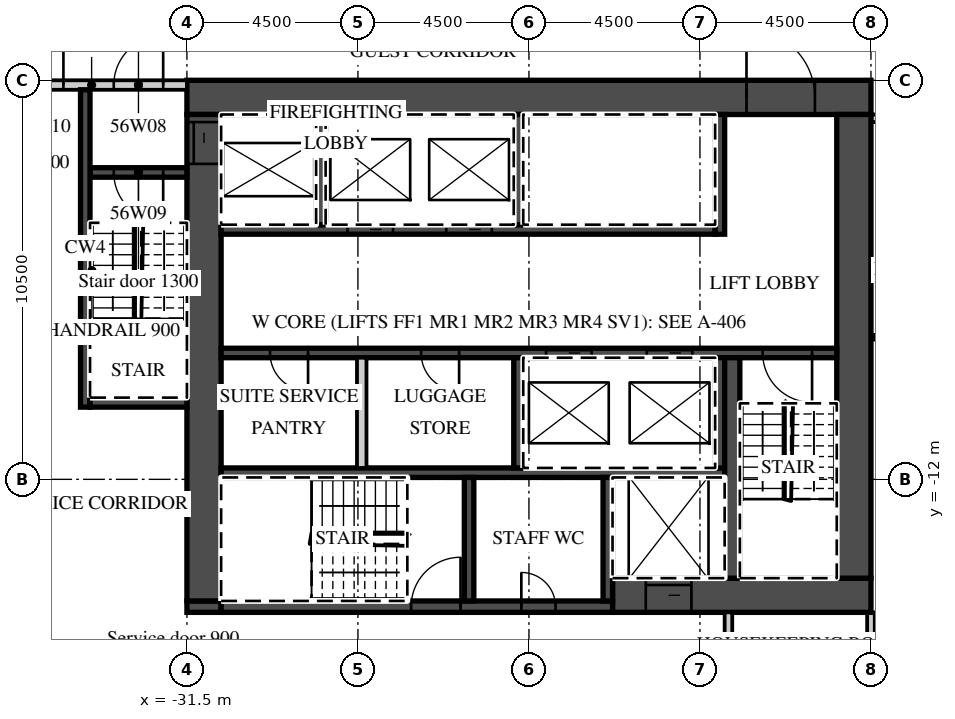
"""IFC4 building model, lengths in metres.
Left out: names, types, materials, properties, quantities, classifications, styles, units other than length and angle.
Written with IfcOpenShell. Run it as: python <this file> out.ifc"""

import sys

from ifc_helpers import new_model, si_unit, direction, frame, frame_2d, origin, place, context, subcontext, project, spatial, rectangle, extrude, element, fill, save


model = new_model("IFC4")
c1 = context("Model", 3, precision=1e-05, world=origin(), true_north=direction((0.0, 1.0)))
c2 = subcontext(c1, "Body", "Model", "MODEL_VIEW")
j1 = project(units=[si_unit("LENGTHUNIT", "METRE"), si_unit("PLANEANGLEUNIT", "RADIAN")], contexts=[c1])
p1 = place(None, origin())
s1 = spatial("IfcSite", under=j1, at=p1, CompositionType="ELEMENT")
p2 = place(p1, origin())
s2 = spatial("IfcBuilding", under=s1, at=p2, CompositionType="ELEMENT")
p3 = place(p2, frame((0.0, 0.0, 230.9)))
s3 = spatial("IfcBuildingStorey", under=s2, at=p3, CompositionType="ELEMENT", Elevation=230.9)
p4 = place(p3, frame((-13.5, -19.641, 0.0), z_axis=(0.0, 0.0, 1.0), x_axis=(0.0, 1.0, 0.0)))
e1 = element("IfcWall", 1, at=p4, inside=s3, PredefinedType="PARTITIONING", context=c2, shape_type="SweptSolid", body=[
    extrude(rectangle(XDim=4.141, YDim=0.2, at=frame_2d((2.071, 0.0))), origin(), (0.0, 0.0, 1.0), 3.02),
])
p5 = place(p3, frame((-13.5, -2.5, 0.0), z_axis=(0.0, 0.0, 1.0), x_axis=(1.0, 0.0, 0.0)))
e2 = element("IfcWall", 2, at=p5, inside=s3, PredefinedType="PARTITIONING", context=c2, shape_type="SweptSolid", body=[
    extrude(rectangle(XDim=27.0, YDim=0.2, at=frame_2d((13.5, 0.0))), origin(), (0.0, 0.0, 1.0), 3.02),
])
p6 = place(p5, frame((2.925, 0.0, 0.0)))
e3 = element("IfcOpeningElement", 3, at=p6, cuts=e2, PredefinedType="OPENING", context=c2, shape_type="SweptSolid", body=[
    extrude(rectangle(XDim=1.0, YDim=2.1, at=frame_2d((0.5, 1.05))), frame((0.0, 0.11, 0.0), z_axis=(0.0, -1.0, 0.0), x_axis=(1.0, 0.0, 0.0)), (0.0, 0.0, 1.0), 0.22),
])
p7 = place(p5, frame((9.863, 0.0, 0.0)))
e4 = element("IfcOpeningElement", 4, at=p7, cuts=e2, PredefinedType="OPENING", context=c2, shape_type="SweptSolid", body=[
    extrude(rectangle(XDim=1.2, YDim=2.1, at=frame_2d((0.6, 1.05))), frame((0.0, 0.11, 0.0), z_axis=(0.0, -1.0, 0.0), x_axis=(1.0, 0.0, 0.0)), (0.0, 0.0, 1.0), 0.22),
])
p8 = place(p5, frame((16.45, 0.0, 0.0)))
e5 = element("IfcOpeningElement", 5, at=p8, cuts=e2, PredefinedType="OPENING", context=c2, shape_type="SweptSolid", body=[
    extrude(rectangle(XDim=1.0, YDim=2.1, at=frame_2d((0.5, 1.05))), frame((0.0, 0.11, 0.0), z_axis=(0.0, -1.0, 0.0), x_axis=(1.0, 0.0, 0.0)), (0.0, 0.0, 1.0), 0.22),
])
p9 = place(p5, frame((20.925, 0.0, 0.0)))
e6 = element("IfcOpeningElement", 6, at=p9, cuts=e2, PredefinedType="OPENING", context=c2, shape_type="SweptSolid", body=[
    extrude(rectangle(XDim=1.0, YDim=2.1, at=frame_2d((0.5, 1.05))), frame((0.0, 0.11, 0.0), z_axis=(0.0, -1.0, 0.0), x_axis=(1.0, 0.0, 0.0)), (0.0, 0.0, 1.0), 0.22),
])
p10 = place(p5, frame((25.425, 0.0, 0.0)))
e7 = element("IfcOpeningElement", 7, at=p10, cuts=e2, PredefinedType="OPENING", context=c2, shape_type="SweptSolid", body=[
    extrude(rectangle(XDim=1.0, YDim=2.1, at=frame_2d((0.5, 1.05))), frame((0.0, 0.11, 0.0), z_axis=(0.0, -1.0, 0.0), x_axis=(1.0, 0.0, 0.0)), (0.0, 0.0, 1.0), 0.22),
])
p11 = place(p3, frame((-31.5, -1.95, 0.0), z_axis=(0.0, 0.0, 1.0), x_axis=(1.0, 0.0, 0.0)))
e8 = element("IfcWall", 8, at=p11, inside=s3, PredefinedType="SHEAR", context=c2, shape_type="SweptSolid", body=[
    extrude(rectangle(XDim=18.0, YDim=0.9, at=frame_2d((9.0, 0.0))), origin(), (0.0, 0.0, 1.0), 3.02),
])
p12 = place(p11, frame((14.725, 0.0, 0.0)))
e9 = element("IfcOpeningElement", 9, at=p12, cuts=e8, PredefinedType="OPENING", context=c2, shape_type="SweptSolid", body=[
    extrude(rectangle(XDim=1.8, YDim=2.1, at=frame_2d((0.9, 1.05))), frame((0.0, 0.46, 0.0), z_axis=(0.0, -1.0, 0.0), x_axis=(1.0, 0.0, 0.0)), (0.0, 0.0, 1.0), 0.92),
])
p13 = place(p3, frame((-20.3, -15.05, 0.0), z_axis=(0.0, 0.0, 1.0), x_axis=(1.0, 0.0, 0.0)))
e10 = element("IfcWall", 10, at=p13, inside=s3, PredefinedType="SHEAR", context=c2, shape_type="SweptSolid", body=[
    extrude(rectangle(XDim=6.8, YDim=0.9, at=frame_2d((3.4, 0.0))), origin(), (0.0, 0.0, 1.0), 3.02),
])
p14 = place(p13, frame((0.875, 0.0, 0.0)))
e11 = element("IfcOpeningElement", 11, at=p14, cuts=e10, PredefinedType="OPENING", context=c2, shape_type="SweptSolid", body=[
    extrude(rectangle(XDim=1.2, YDim=2.1, at=frame_2d((0.6, 1.05))), frame((0.0, 0.46, 0.0), z_axis=(0.0, -1.0, 0.0), x_axis=(1.0, 0.0, 0.0)), (0.0, 0.0, 1.0), 0.92),
])
p15 = place(p3, frame((-31.5, -15.35, 0.0), z_axis=(0.0, 0.0, 1.0), x_axis=(1.0, 0.0, 0.0)))
e12 = element("IfcWall", 12, at=p15, inside=s3, PredefinedType="SHEAR", context=c2, shape_type="SweptSolid", body=[
    extrude(rectangle(XDim=0.9, YDim=0.3, at=frame_2d((0.45, 0.0))), origin(), (0.0, 0.0, 1.0), 3.02),
])
p16 = place(p3, frame((-30.6, -15.35, 0.0), z_axis=(0.0, 0.0, 1.0), x_axis=(1.0, 0.0, 0.0)))
e13 = element("IfcWall", 13, at=p16, inside=s3, PredefinedType="SHEAR", context=c2, shape_type="SweptSolid", body=[
    extrude(rectangle(XDim=10.3, YDim=0.3, at=frame_2d((5.15, 0.0))), origin(), (0.0, 0.0, 1.0), 3.02),
])
p17 = place(p16, frame((5.0, 0.0, 0.0)))
e14 = element("IfcOpeningElement", 14, at=p17, cuts=e13, PredefinedType="OPENING", context=c2, shape_type="SweptSolid", body=[
    extrude(rectangle(XDim=1.3, YDim=2.1, at=frame_2d((0.65, 1.05))), frame((0.0, 0.16, 0.0), z_axis=(0.0, -1.0, 0.0), x_axis=(1.0, 0.0, 0.0)), (0.0, 0.0, 1.0), 0.32),
])
p18 = place(p16, frame((7.9, 0.0, 0.0)))
e15 = element("IfcOpeningElement", 15, at=p18, cuts=e13, PredefinedType="OPENING", context=c2, shape_type="SweptSolid", body=[
    extrude(rectangle(XDim=0.9, YDim=2.1, at=frame_2d((0.45, 1.05))), frame((0.0, 0.16, 0.0), z_axis=(0.0, -1.0, 0.0), x_axis=(1.0, 0.0, 0.0)), (0.0, 0.0, 1.0), 0.32),
])
p19 = place(p3, frame((-31.05, -15.2, 0.0), z_axis=(0.0, 0.0, 1.0), x_axis=(0.0, 1.0, 0.0)))
e16 = element("IfcWall", 16, at=p19, inside=s3, PredefinedType="SHEAR", context=c2, shape_type="SweptSolid", body=[
    extrude(rectangle(XDim=12.8, YDim=0.9, at=frame_2d((6.4, 0.0))), origin(), (0.0, 0.0, 1.0), 3.02),
])
p20 = place(p19, frame((11.5, 0.0, 0.0)))
e17 = element("IfcOpeningElement", 17, at=p20, cuts=e16, PredefinedType="OPENING", context=c2, shape_type="SweptSolid", body=[
    extrude(rectangle(XDim=1.1, YDim=2.1, at=frame_2d((0.55, 1.05))), frame((0.0, 0.46, 0.0), z_axis=(0.0, -1.0, 0.0), x_axis=(1.0, 0.0, 0.0)), (0.0, 0.0, 1.0), 0.92),
])
p21 = place(p3, frame((-13.95, -14.6, 0.0), z_axis=(0.0, 0.0, 1.0), x_axis=(0.0, 1.0, 0.0)))
e18 = element("IfcWall", 18, at=p21, inside=s3, PredefinedType="SHEAR", context=c2, shape_type="SweptSolid", body=[
    extrude(rectangle(XDim=12.2, YDim=0.9, at=frame_2d((6.1, 0.0))), origin(), (0.0, 0.0, 1.0), 3.02),
])
p22 = place(p3, frame((-30.6, -5.425, 0.0), z_axis=(0.0, 0.0, 1.0), x_axis=(1.0, 0.0, 0.0)))
e19 = element("IfcWall", 19, at=p22, inside=s3, PredefinedType="SHEAR", context=c2, shape_type="SweptSolid", body=[
    extrude(rectangle(XDim=13.0, YDim=0.25, at=frame_2d((6.5, 0.0))), origin(), (0.0, 0.0, 1.0), 3.02),
])
p23 = place(p22, frame((3.325, 0.0, 0.0)))
e20 = element("IfcOpeningElement", 20, at=p23, cuts=e19, PredefinedType="OPENING", context=c2, shape_type="SweptSolid", body=[
    extrude(rectangle(XDim=1.2, YDim=2.1, at=frame_2d((0.6, 1.05))), frame((0.0, 0.135, 0.0), z_axis=(0.0, -1.0, 0.0), x_axis=(1.0, 0.0, 0.0)), (0.0, 0.0, 1.0), 0.27),
])
p24 = place(p22, frame((5.925, 0.0, 0.0)))
e21 = element("IfcOpeningElement", 21, at=p24, cuts=e19, PredefinedType="OPENING", context=c2, shape_type="SweptSolid", body=[
    extrude(rectangle(XDim=1.2, YDim=2.1, at=frame_2d((0.6, 1.05))), frame((0.0, 0.135, 0.0), z_axis=(0.0, -1.0, 0.0), x_axis=(1.0, 0.0, 0.0)), (0.0, 0.0, 1.0), 0.27),
])
p25 = place(p3, frame((-17.475, -5.55, 0.0), z_axis=(0.0, 0.0, 1.0), x_axis=(0.0, 1.0, 0.0)))
e22 = element("IfcWall", 22, at=p25, inside=s3, PredefinedType="SHEAR", context=c2, shape_type="SweptSolid", body=[
    extrude(rectangle(XDim=3.15, YDim=0.25, at=frame_2d((1.575, 0.0))), origin(), (0.0, 0.0, 1.0), 3.02),
])
for number, where, z_axis, x_axis in (
    (23, (-27.975, -5.3, 0.0), (0.0, 0.0, 1.0), (0.0, 1.0, 0.0)),
    (24, (-22.775, -5.3, 0.0), (0.0, 0.0, 1.0), (0.0, 1.0, 0.0)),
):
    element("IfcWall", number, at=place(p3, frame(where, z_axis=z_axis, x_axis=x_axis)), inside=s3, PredefinedType="SHEAR", context=c2, shape_type="SweptSolid", body=[
        extrude(rectangle(XDim=2.9, YDim=0.25, at=frame_2d((1.45, 0.0))), origin(), (0.0, 0.0, 1.0), 3.02),
    ])
p26 = place(p3, frame((-30.6, -8.675, 0.0), z_axis=(0.0, 0.0, 1.0), x_axis=(1.0, 0.0, 0.0)))
e25 = element("IfcWall", 25, at=p26, inside=s3, PredefinedType="SHEAR", context=c2, shape_type="SweptSolid", body=[
    extrude(rectangle(XDim=16.2, YDim=0.25, at=frame_2d((8.1, 0.0))), origin(), (0.0, 0.0, 1.0), 3.02),
])
p27 = place(p26, frame((8.55, 0.0, 0.0)))
e26 = element("IfcOpeningElement", 26, at=p27, cuts=e25, PredefinedType="OPENING", context=c2, shape_type="SweptSolid", body=[
    extrude(rectangle(XDim=1.2, YDim=2.1, at=frame_2d((0.6, 1.05))), frame((0.0, 0.135, 0.0), z_axis=(0.0, -1.0, 0.0), x_axis=(1.0, 0.0, 0.0)), (0.0, 0.0, 1.0), 0.27),
])
p28 = place(p26, frame((11.2, 0.0, 0.0)))
e27 = element("IfcOpeningElement", 27, at=p28, cuts=e25, PredefinedType="OPENING", context=c2, shape_type="SweptSolid", body=[
    extrude(rectangle(XDim=1.2, YDim=2.1, at=frame_2d((0.6, 1.05))), frame((0.0, 0.135, 0.0), z_axis=(0.0, -1.0, 0.0), x_axis=(1.0, 0.0, 0.0)), (0.0, 0.0, 1.0), 0.27),
])
p29 = place(p26, frame((14.25, 0.0, 0.0)))
e28 = element("IfcOpeningElement", 28, at=p29, cuts=e25, PredefinedType="OPENING", context=c2, shape_type="SweptSolid", body=[
    extrude(rectangle(XDim=1.3, YDim=2.1, at=frame_2d((0.65, 1.05))), frame((0.0, 0.135, 0.0), z_axis=(0.0, -1.0, 0.0), x_axis=(1.0, 0.0, 0.0)), (0.0, 0.0, 1.0), 0.27),
])
p30 = place(p26, frame((1.288, 0.0, 0.0)))
e29 = element("IfcOpeningElement", 29, at=p30, cuts=e25, PredefinedType="OPENING", context=c2, shape_type="SweptSolid", body=[
    extrude(rectangle(XDim=1.0, YDim=2.1, at=frame_2d((0.5, 1.05))), frame((0.0, 0.135, 0.0), z_axis=(0.0, -1.0, 0.0), x_axis=(1.0, 0.0, 0.0)), (0.0, 0.0, 1.0), 0.27),
])
p31 = place(p26, frame((5.262, 0.0, 0.0)))
e30 = element("IfcOpeningElement", 30, at=p31, cuts=e25, PredefinedType="OPENING", context=c2, shape_type="SweptSolid", body=[
    extrude(rectangle(XDim=1.0, YDim=2.1, at=frame_2d((0.5, 1.05))), frame((0.0, 0.135, 0.0), z_axis=(0.0, -1.0, 0.0), x_axis=(1.0, 0.0, 0.0)), (0.0, 0.0, 1.0), 0.27),
])
p32 = place(p3, frame((-30.6, -11.825, 0.0), z_axis=(0.0, 0.0, 1.0), x_axis=(1.0, 0.0, 0.0)))
e31 = element("IfcWall", 31, at=p32, inside=s3, PredefinedType="SHEAR", context=c2, shape_type="SweptSolid", body=[
    extrude(rectangle(XDim=13.25, YDim=0.25, at=frame_2d((6.625, 0.0))), origin(), (0.0, 0.0, 1.0), 3.02),
])
for number, where, z_axis, x_axis in (
    (32, (-17.475, -11.7, 0.0), (0.0, 0.0, 1.0), (0.0, 1.0, 0.0)),
    (33, (-22.775, -11.7, 0.0), (0.0, 0.0, 1.0), (0.0, 1.0, 0.0)),
):
    element("IfcWall", number, at=place(p3, frame(where, z_axis=z_axis, x_axis=x_axis)), inside=s3, PredefinedType="SHEAR", context=c2, shape_type="SweptSolid", body=[
        extrude(rectangle(XDim=2.9, YDim=0.25, at=frame_2d((1.45, 0.0))), origin(), (0.0, 0.0, 1.0), 3.02),
    ])
p33 = place(p3, frame((-26.9, -11.7, 0.0), z_axis=(0.0, 0.0, 1.0), x_axis=(0.0, 1.0, 0.0)))
e34 = element("IfcWall", 34, at=p33, inside=s3, PredefinedType="PARTITIONING", context=c2, shape_type="SweptSolid", body=[
    extrude(rectangle(XDim=2.9, YDim=0.25, at=frame_2d((1.45, 0.0))), origin(), (0.0, 0.0, 1.0), 3.02),
])
p34 = place(p3, frame((-17.15, -14.6, 0.0), z_axis=(0.0, 0.0, 1.0), x_axis=(0.0, 1.0, 0.0)))
e35 = element("IfcWall", 35, at=p34, inside=s3, PredefinedType="SHEAR", context=c2, shape_type="SweptSolid", body=[
    extrude(rectangle(XDim=5.8, YDim=0.4, at=frame_2d((2.9, 0.0))), origin(), (0.0, 0.0, 1.0), 3.02),
])
for number, where, z_axis, x_axis in (
    (36, (-20.425, -15.2, 0.0), (0.0, 0.0, 1.0), (0.0, 1.0, 0.0)),
    (37, (-24.075, -15.2, 0.0), (0.0, 0.0, 1.0), (0.0, 1.0, 0.0)),
):
    element("IfcWall", number, at=place(p3, frame(where, z_axis=z_axis, x_axis=x_axis)), inside=s3, PredefinedType="SHEAR", context=c2, shape_type="SweptSolid", body=[
        extrude(rectangle(XDim=3.25, YDim=0.25, at=frame_2d((1.625, 0.0))), origin(), (0.0, 0.0, 1.0), 3.02),
    ])
p35 = place(p3, frame((-36.515, -1.625, 0.0), z_axis=(0.0, 0.0, 1.0), x_axis=(1.0, 0.0, 0.0)))
e38 = element("IfcWall", 38, at=p35, inside=s3, PredefinedType="PARTITIONING", context=c2, shape_type="SweptSolid", body=[
    extrude(rectangle(XDim=5.015, YDim=0.25, at=frame_2d((2.508, 0.0))), origin(), (0.0, 0.0, 1.0), 3.02),
])
p36 = place(p35, frame((3.09, 0.0, 0.0)))
e39 = element("IfcOpeningElement", 39, at=p36, cuts=e38, PredefinedType="OPENING", context=c2, shape_type="SweptSolid", body=[
    extrude(rectangle(XDim=1.3, YDim=2.1, at=frame_2d((0.65, 1.05))), frame((0.0, 0.135, 0.0), z_axis=(0.0, -1.0, 0.0), x_axis=(1.0, 0.0, 0.0)), (0.0, 0.0, 1.0), 0.27),
])
p37 = place(p35, frame((0.665, 0.0, 0.0)))
e40 = element("IfcOpeningElement", 40, at=p37, cuts=e38, PredefinedType="OPENING", context=c2, shape_type="SweptSolid", body=[
    extrude(rectangle(XDim=1.1, YDim=2.1, at=frame_2d((0.55, 1.05))), frame((0.0, 0.135, 0.0), z_axis=(0.0, -1.0, 0.0), x_axis=(1.0, 0.0, 0.0)), (0.0, 0.0, 1.0), 0.27),
])
p38 = place(p3, frame((-34.05, -3.925, 0.0), z_axis=(0.0, 0.0, 1.0), x_axis=(1.0, 0.0, 0.0)))
e41 = element("IfcWall", 41, at=p38, inside=s3, PredefinedType="SHEAR", context=c2, shape_type="SweptSolid", body=[
    extrude(rectangle(XDim=2.55, YDim=0.25, at=frame_2d((1.275, 0.0))), origin(), (0.0, 0.0, 1.0), 3.02),
])
p39 = place(p38, frame((0.625, 0.0, 0.0)))
e42 = element("IfcOpeningElement", 42, at=p39, cuts=e41, PredefinedType="OPENING", context=c2, shape_type="SweptSolid", body=[
    extrude(rectangle(XDim=1.3, YDim=2.1, at=frame_2d((0.65, 1.05))), frame((0.0, 0.135, 0.0), z_axis=(0.0, -1.0, 0.0), x_axis=(1.0, 0.0, 0.0)), (0.0, 0.0, 1.0), 0.27),
])
p40 = place(p3, frame((-34.175, -10.1, 0.0), z_axis=(0.0, 0.0, 1.0), x_axis=(0.0, 1.0, 0.0)))
e43 = element("IfcWall", 43, at=p40, inside=s3, PredefinedType="SHEAR", context=c2, shape_type="SweptSolid", body=[
    extrude(rectangle(XDim=8.35, YDim=0.25, at=frame_2d((4.175, 0.0))), origin(), (0.0, 0.0, 1.0), 3.02),
])
p41 = place(p3, frame((-34.05, -9.975, 0.0), z_axis=(0.0, 0.0, 1.0), x_axis=(1.0, 0.0, 0.0)))
e44 = element("IfcWall", 44, at=p41, inside=s3, PredefinedType="SHEAR", context=c2, shape_type="SweptSolid", body=[
    extrude(rectangle(XDim=2.55, YDim=0.25, at=frame_2d((1.275, 0.0))), origin(), (0.0, 0.0, 1.0), 3.02),
])
p42 = place(p3, frame((-17.25, -17.7, 0.0), z_axis=(0.0, 0.0, 1.0), x_axis=(0.0, 1.0, 0.0)))
e45 = element("IfcWall", 45, at=p42, inside=s3, PredefinedType="PARTITIONING", context=c2, shape_type="SweptSolid", body=[
    extrude(rectangle(XDim=2.2, YDim=0.2, at=frame_2d((1.1, 0.0))), origin(), (0.0, 0.0, 1.0), 3.02),
])
p43 = place(p27, origin())
e46 = element("IfcDoor", 46, at=p43, inside=s3, OperationType="SLIDING_TO_LEFT", PredefinedType="DOOR", context=c2, shape_type="SweptSolid", body=[
    extrude(rectangle(XDim=1.2, YDim=2.1, at=frame_2d((0.6, 1.05))), frame((0.0, 0.025, 0.0), z_axis=(0.0, -1.0, 0.0), x_axis=(1.0, 0.0, 0.0)), (0.0, 0.0, 1.0), 0.05),
])
fill(e26, e46)
p44 = place(p28, origin())
e47 = element("IfcDoor", 47, at=p44, inside=s3, OperationType="SLIDING_TO_RIGHT", PredefinedType="DOOR", context=c2, shape_type="SweptSolid", body=[
    extrude(rectangle(XDim=1.2, YDim=2.1, at=frame_2d((0.6, 1.05))), frame((0.0, 0.025, 0.0), z_axis=(0.0, -1.0, 0.0), x_axis=(1.0, 0.0, 0.0)), (0.0, 0.0, 1.0), 0.05),
])
fill(e27, e47)
p45 = place(p23, origin())
e48 = element("IfcDoor", 48, at=p45, inside=s3, OperationType="SLIDING_TO_RIGHT", PredefinedType="DOOR", context=c2, shape_type="SweptSolid", body=[
    extrude(rectangle(XDim=1.2, YDim=2.1, at=frame_2d((0.6, 1.05))), frame((0.0, 0.025, 0.0), z_axis=(0.0, -1.0, 0.0), x_axis=(1.0, 0.0, 0.0)), (0.0, 0.0, 1.0), 0.05),
])
fill(e20, e48)
p46 = place(p24, origin())
e49 = element("IfcDoor", 49, at=p46, inside=s3, OperationType="SLIDING_TO_RIGHT", PredefinedType="DOOR", context=c2, shape_type="SweptSolid", body=[
    extrude(rectangle(XDim=1.2, YDim=2.1, at=frame_2d((0.6, 1.05))), frame((0.0, 0.025, 0.0), z_axis=(0.0, -1.0, 0.0), x_axis=(1.0, 0.0, 0.0)), (0.0, 0.0, 1.0), 0.05),
])
fill(e21, e49)
p47 = place(p14, origin())
e50 = element("IfcDoor", 50, at=p47, inside=s3, OperationType="SLIDING_TO_LEFT", PredefinedType="DOOR", context=c2, shape_type="SweptSolid", body=[
    extrude(rectangle(XDim=1.2, YDim=2.1, at=frame_2d((0.6, 1.05))), frame((0.0, 0.025, 0.0), z_axis=(0.0, -1.0, 0.0), x_axis=(1.0, 0.0, 0.0)), (0.0, 0.0, 1.0), 0.05),
])
fill(e11, e50)
p48 = place(p20, origin())
e51 = element("IfcDoor", 51, at=p48, inside=s3, OperationType="SLIDING_TO_RIGHT", PredefinedType="DOOR", context=c2, shape_type="SweptSolid", body=[
    extrude(rectangle(XDim=1.1, YDim=2.1, at=frame_2d((0.55, 1.05))), frame((0.0, 0.025, 0.0), z_axis=(0.0, -1.0, 0.0), x_axis=(1.0, 0.0, 0.0)), (0.0, 0.0, 1.0), 0.05),
])
fill(e17, e51)
p49 = place(p12, origin())
e52 = element("IfcDoor", 52, at=p49, inside=s3, OperationType="DOUBLE_DOOR_DOUBLE_SWING", PredefinedType="DOOR", context=c2, shape_type="SweptSolid", body=[
    extrude(rectangle(XDim=1.8, YDim=2.1, at=frame_2d((0.9, 1.05))), frame((0.0, 0.025, 0.0), z_axis=(0.0, -1.0, 0.0), x_axis=(1.0, 0.0, 0.0)), (0.0, 0.0, 1.0), 0.05),
])
fill(e9, e52)
p50 = place(p36, origin())
e53 = element("IfcDoor", 53, at=p50, inside=s3, OperationType="SINGLE_SWING_RIGHT", PredefinedType="DOOR", context=c2, shape_type="SweptSolid", body=[
    extrude(rectangle(XDim=1.3, YDim=2.1, at=frame_2d((0.65, 1.05))), frame((0.0, 0.025, 0.0), z_axis=(0.0, -1.0, 0.0), x_axis=(1.0, 0.0, 0.0)), (0.0, 0.0, 1.0), 0.05),
])
fill(e39, e53)
p51 = place(p39, origin())
e54 = element("IfcDoor", 54, at=p51, inside=s3, OperationType="SINGLE_SWING_RIGHT", PredefinedType="DOOR", context=c2, shape_type="SweptSolid", body=[
    extrude(rectangle(XDim=1.3, YDim=2.1, at=frame_2d((0.65, 1.05))), frame((0.0, 0.025, 0.0), z_axis=(0.0, -1.0, 0.0), x_axis=(1.0, 0.0, 0.0)), (0.0, 0.0, 1.0), 0.05),
])
fill(e42, e54)
p52 = place(p37, origin())
e55 = element("IfcDoor", 55, at=p52, inside=s3, OperationType="SINGLE_SWING_RIGHT", PredefinedType="DOOR", context=c2, shape_type="SweptSolid", body=[
    extrude(rectangle(XDim=1.1, YDim=2.1, at=frame_2d((0.55, 1.05))), frame((0.0, 0.025, 0.0), z_axis=(0.0, -1.0, 0.0), x_axis=(1.0, 0.0, 0.0)), (0.0, 0.0, 1.0), 0.05),
])
fill(e40, e55)
p53 = place(p29, origin())
e56 = element("IfcDoor", 56, at=p53, inside=s3, OperationType="SINGLE_SWING_RIGHT", PredefinedType="DOOR", context=c2, shape_type="SweptSolid", body=[
    extrude(rectangle(XDim=1.3, YDim=2.1, at=frame_2d((0.65, 1.05))), frame((0.0, 0.025, 0.0), z_axis=(0.0, -1.0, 0.0), x_axis=(1.0, 0.0, 0.0)), (0.0, 0.0, 1.0), 0.05),
])
fill(e28, e56)
p54 = place(p17, origin())
e57 = element("IfcDoor", 57, at=p54, inside=s3, OperationType="SINGLE_SWING_RIGHT", PredefinedType="DOOR", context=c2, shape_type="SweptSolid", body=[
    extrude(rectangle(XDim=1.3, YDim=2.1, at=frame_2d((0.65, 1.05))), frame((0.0, 0.025, 0.0), z_axis=(0.0, -1.0, 0.0), x_axis=(1.0, 0.0, 0.0)), (0.0, 0.0, 1.0), 0.05),
])
fill(e14, e57)
p55 = place(p18, origin())
e58 = element("IfcDoor", 58, at=p55, inside=s3, OperationType="SINGLE_SWING_LEFT", PredefinedType="DOOR", context=c2, shape_type="SweptSolid", body=[
    extrude(rectangle(XDim=0.9, YDim=2.1, at=frame_2d((0.45, 1.05))), frame((0.0, 0.025, 0.0), z_axis=(0.0, -1.0, 0.0), x_axis=(1.0, 0.0, 0.0)), (0.0, 0.0, 1.0), 0.05),
])
fill(e15, e58)
p56 = place(p30, origin())
e59 = element("IfcDoor", 59, at=p56, inside=s3, OperationType="SINGLE_SWING_RIGHT", PredefinedType="DOOR", context=c2, shape_type="SweptSolid", body=[
    extrude(rectangle(XDim=1.0, YDim=2.1, at=frame_2d((0.5, 1.05))), frame((0.0, 0.025, 0.0), z_axis=(0.0, -1.0, 0.0), x_axis=(1.0, 0.0, 0.0)), (0.0, 0.0, 1.0), 0.05),
])
fill(e29, e59)
p57 = place(p31, origin())
e60 = element("IfcDoor", 60, at=p57, inside=s3, OperationType="SINGLE_SWING_RIGHT", PredefinedType="DOOR", context=c2, shape_type="SweptSolid", body=[
    extrude(rectangle(XDim=1.0, YDim=2.1, at=frame_2d((0.5, 1.05))), frame((0.0, 0.025, 0.0), z_axis=(0.0, -1.0, 0.0), x_axis=(1.0, 0.0, 0.0)), (0.0, 0.0, 1.0), 0.05),
])
fill(e30, e60)
save(model, sys.argv[1])
